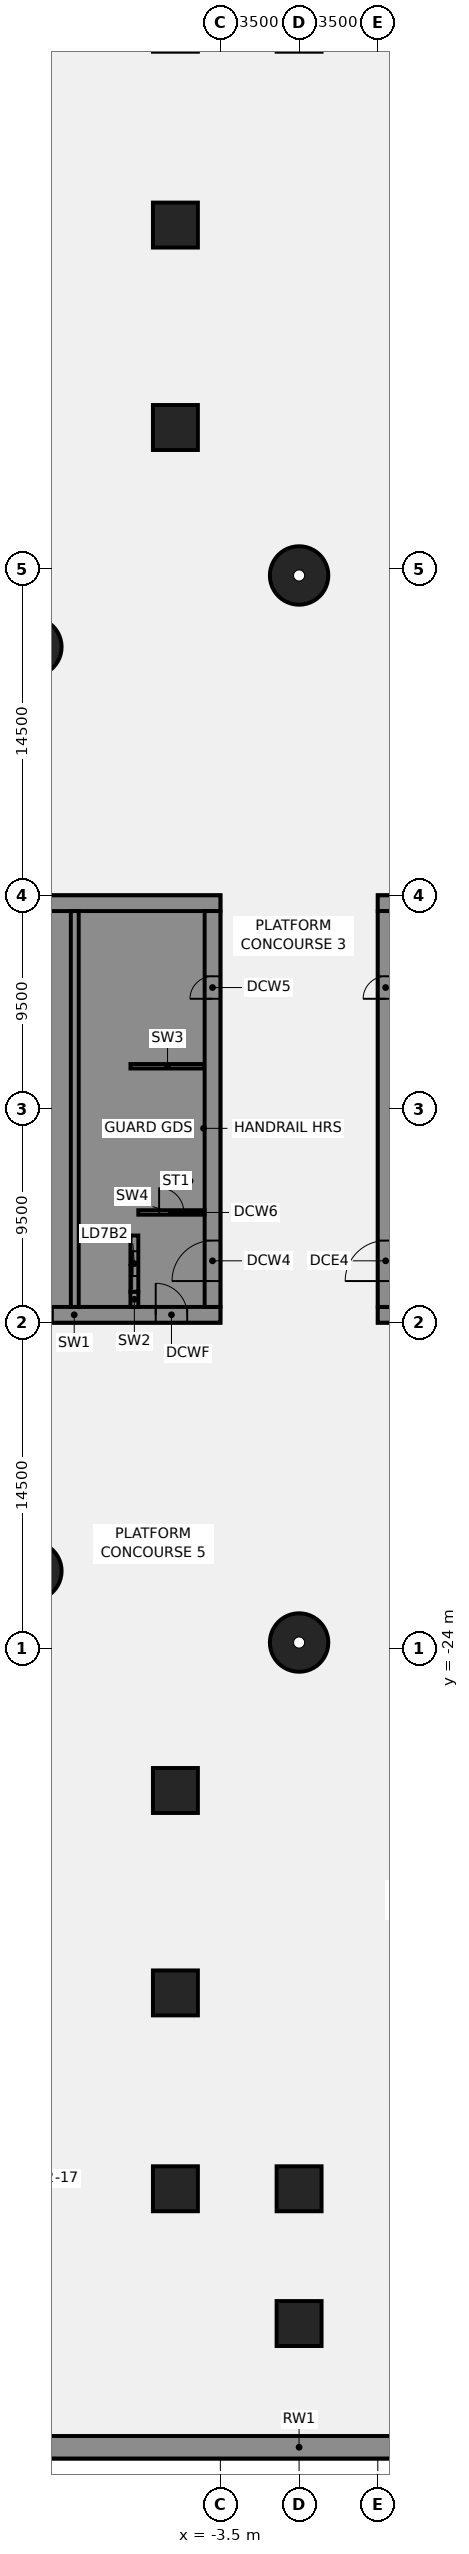
"""IFC4 building model, lengths in metres.
Left out: names, types, materials, properties, quantities, classifications, styles, units other than length and angle.
Written with IfcOpenShell. Run it as: python <this file> out.ifc"""

import sys

from ifc_helpers import new_model, si_unit, direction, frame, frame_2d, origin, origin_2d, place, context, subcontext, project, spatial, polyline, rectangle, circle, outline, extrude, element, fill, save


model = new_model("IFC4")
c1 = context("Model", 3, precision=1e-05, world=origin(), true_north=direction((0.0, 1.0)))
c2 = subcontext(c1, "Body", "Model", "MODEL_VIEW")
j1 = project(units=[si_unit("LENGTHUNIT", "METRE"), si_unit("PLANEANGLEUNIT", "RADIAN")], contexts=[c1])
p1 = place(None, origin())
s1 = spatial("IfcSite", under=j1, at=p1, CompositionType="ELEMENT")
p2 = place(p1, origin())
s2 = spatial("IfcBuilding", under=s1, at=p2, CompositionType="ELEMENT")
p3 = place(p2, frame((0.0, 0.0, -14.0)))
s3 = spatial("IfcBuildingStorey", under=s2, at=p3, CompositionType="ELEMENT", Elevation=-14.0)
p4 = place(p3, frame((63.931, -59.5, -0.45), z_axis=(0.0, 0.0, 1.0), x_axis=(-1.0, 0.0, 0.0)))
e1 = element("IfcWall", 1, at=p4, inside=s3, PredefinedType="SOLIDWALL", context=c2, shape_type="SweptSolid", body=[
    extrude(rectangle(XDim=127.863, YDim=1.0, at=frame_2d((63.931, 0.0))), origin(), (0.0, 0.0, 1.0), 7.0),
])
for number, where, z_axis, x_axis in (
    (2, (0.0, 23.721, -0.45), (0.0, 0.0, 1.0), (1.0, 0.0, 0.0)),
    (3, (-11.86, 20.543, -0.45), (0.0, 0.0, 1.0), (1.0, 0.0, 0.0)),
    (4, (-11.86, -20.543, -0.45), (0.0, 0.0, 1.0), (1.0, 0.0, 0.0)),
    (5, (0.0, -23.721, -0.45), (0.0, 0.0, 1.0), (1.0, 0.0, 0.0)),
):
    element("IfcColumn", number, at=place(p3, frame(where, z_axis=z_axis, x_axis=x_axis)), inside=s3, PredefinedType="COLUMN", context=c2, shape_type="SweptSolid", body=[
        extrude(circle(Radius=1.3, at=origin_2d()), origin(), (0.0, 0.0, 1.0), 7.0),
    ])
for number, where, z_axis, x_axis in (
    (6, (-5.5, 39.3, -0.45), (0.0, 0.0, 1.0), (1.0, 0.0, 0.0)),
    (7, (-5.5, 30.3, -0.45), (0.0, 0.0, 1.0), (1.0, 0.0, 0.0)),
    (8, (-5.5, -39.3, -0.45), (0.0, 0.0, 1.0), (1.0, 0.0, 0.0)),
    (9, (-5.5, -30.3, -0.45), (0.0, 0.0, 1.0), (1.0, 0.0, 0.0)),
    (10, (-5.5, -48.008, -0.45), (0.0, 0.0, 1.0), (1.0, 0.0, 0.0)),
    (11, (0.0, -48.008, -0.45), (0.0, 0.0, 1.0), (1.0, 0.0, 0.0)),
    (12, (0.0, -54.0, -0.45), (0.0, 0.0, 1.0), (1.0, 0.0, 0.0)),
):
    element("IfcColumn", number, at=place(p3, frame(where, z_axis=z_axis, x_axis=x_axis)), inside=s3, PredefinedType="COLUMN", context=c2, shape_type="SweptSolid", body=[
        extrude(rectangle(XDim=2.0, YDim=2.0, at=origin_2d()), origin(), (0.0, 0.0, 1.0), 7.0),
    ])
p5 = place(p3, frame((-16.5, -9.15, 0.0), z_axis=(0.0, 0.0, 1.0), x_axis=(1.0, 0.0, 0.0)))
e13 = element("IfcWall", 13, at=p5, inside=s3, PredefinedType="SHEAR", context=c2, shape_type="SweptSolid", body=[
    extrude(rectangle(XDim=13.0, YDim=0.7, at=frame_2d((6.5, 0.0))), origin(), (0.0, 0.0, 1.0), 6.55),
])
p6 = place(p5, frame((4.15, 0.0, 0.0)))
e14 = element("IfcOpeningElement", 14, at=p6, cuts=e13, PredefinedType="OPENING", context=c2, shape_type="SweptSolid", body=[
    extrude(rectangle(XDim=1.4, YDim=2.1, at=frame_2d((0.7, 1.05))), frame((0.0, 0.36, 0.0), z_axis=(0.0, -1.0, 0.0), x_axis=(1.0, 0.0, 0.0)), (0.0, 0.0, 1.0), 0.72),
])
p7 = place(p5, frame((10.125, 0.0, 0.0)))
e15 = element("IfcOpeningElement", 15, at=p7, cuts=e13, PredefinedType="OPENING", context=c2, shape_type="SweptSolid", body=[
    extrude(rectangle(XDim=1.4, YDim=2.1, at=frame_2d((0.7, 1.05))), frame((0.0, 0.36, 0.0), z_axis=(0.0, -1.0, 0.0), x_axis=(1.0, 0.0, 0.0)), (0.0, 0.0, 1.0), 0.72),
])
p8 = place(p3, frame((-16.5, 9.15, 0.0), z_axis=(0.0, 0.0, 1.0), x_axis=(1.0, 0.0, 0.0)))
e16 = element("IfcWall", 16, at=p8, inside=s3, PredefinedType="SHEAR", context=c2, shape_type="SweptSolid", body=[
    extrude(rectangle(XDim=13.0, YDim=0.7, at=frame_2d((6.5, 0.0))), origin(), (0.0, 0.0, 1.0), 6.55),
])
p9 = place(p3, origin())
e17 = element("IfcWall", 17, at=p9, inside=s3, PredefinedType="SHEAR", context=c2, shape_type="SweptSolid", body=[
    extrude(outline(polyline([(-9.8, -5.375), (-9.8, -5.625), (-7.5, -5.625), (-7.15, -5.625), (-7.15, 8.8), (-7.5, 8.8), (-9.8, 8.8), (-9.8, 8.125), (-7.5, 8.125), (-7.5, 5.625), (-9.8, 5.625), (-9.8, 5.375), (-7.5, 5.375), (-7.5, 2.875), (-9.8, 2.875), (-9.8, 2.625), (-7.5, 2.625), (-7.5, 0.125), (-9.8, 0.125), (-9.8, -0.125), (-7.5, -0.125), (-7.5, -2.625), (-9.8, -2.625), (-9.8, -2.875), (-7.5, -2.875), (-7.5, -5.375), (-9.8, -5.375)])), origin(), (0.0, 0.0, 1.0), 6.55),
])
p10 = place(p3, origin())
e18 = element("IfcWall", 18, at=p10, inside=s3, PredefinedType="SHEAR", context=c2, shape_type="SweptSolid", body=[
    extrude(outline(polyline([(-7.5, -8.125), (-9.55, -8.125), (-9.55, -5.625), (-9.8, -5.625), (-9.8, -8.125), (-9.8, -8.8), (-7.5, -8.8), (-7.5, -8.125)])), origin(), (0.0, 0.0, 1.0), 6.55),
])
p11 = place(p3, frame((-7.325, -8.8, 0.0), z_axis=(0.0, 0.0, 1.0), x_axis=(0.0, 1.0, 0.0)))
e19 = element("IfcWall", 19, at=p11, inside=s3, PredefinedType="SHEAR", context=c2, shape_type="SweptSolid", body=[
    extrude(rectangle(XDim=0.675, YDim=0.35, at=frame_2d((0.337, 0.0))), origin(), (0.0, 0.0, 1.0), 6.55),
])
p12 = place(p3, frame((-7.5, 1.9, 0.0), z_axis=(0.0, 0.0, 1.0), x_axis=(1.0, 0.0, 0.0)))
e20 = element("IfcWall", 20, at=p12, inside=s3, PredefinedType="SHEAR", context=c2, shape_type="SweptSolid", body=[
    extrude(rectangle(XDim=3.3, YDim=0.2, at=frame_2d((1.65, 0.0))), origin(), (0.0, 0.0, 1.0), 6.55),
])
p13 = place(p3, frame((-9.975, -8.8, 0.0), z_axis=(0.0, 0.0, 1.0), x_axis=(0.0, 1.0, 0.0)))
e21 = element("IfcWall", 21, at=p13, inside=s3, PredefinedType="SHEAR", context=c2, shape_type="SweptSolid", body=[
    extrude(rectangle(XDim=17.6, YDim=0.35, at=frame_2d((8.8, 0.0))), origin(), (0.0, 0.0, 1.0), 6.55),
])
p14 = place(p3, frame((-7.325, -8.125, 0.0), z_axis=(0.0, 0.0, 1.0), x_axis=(0.0, 1.0, 0.0)))
e22 = element("IfcWall", 22, at=p14, inside=s3, PredefinedType="SHEAR", context=c2, shape_type="SweptSolid", body=[
    extrude(rectangle(XDim=2.5, YDim=0.35, at=frame_2d((1.25, 0.0))), origin(), (0.0, 0.0, 1.0), 6.55),
])
p15 = place(p14, frame((0.7, 0.0, 0.0)))
e23 = element("IfcOpeningElement", 23, at=p15, cuts=e22, PredefinedType="OPENING", context=c2, shape_type="SweptSolid", body=[
    extrude(rectangle(XDim=1.1, YDim=2.1, at=frame_2d((0.55, 1.05))), frame((0.0, 0.185, 0.0), z_axis=(0.0, -1.0, 0.0), x_axis=(1.0, 0.0, 0.0)), (0.0, 0.0, 1.0), 0.37),
])
p16 = place(p3, frame((-3.85, -8.8, 0.0), z_axis=(0.0, 0.0, 1.0), x_axis=(0.0, 1.0, 0.0)))
e24 = element("IfcWall", 24, at=p16, inside=s3, PredefinedType="SHEAR", context=c2, shape_type="SweptSolid", body=[
    extrude(rectangle(XDim=17.6, YDim=0.7, at=frame_2d((8.8, 0.0))), origin(), (0.0, 0.0, 1.0), 6.55),
])
p17 = place(p16, frame((1.15, 0.0, 0.0)))
e25 = element("IfcOpeningElement", 25, at=p17, cuts=e24, PredefinedType="OPENING", context=c2, shape_type="SweptSolid", body=[
    extrude(rectangle(XDim=1.8, YDim=2.1, at=frame_2d((0.9, 1.05))), frame((0.0, 0.36, 0.0), z_axis=(0.0, -1.0, 0.0), x_axis=(1.0, 0.0, 0.0)), (0.0, 0.0, 1.0), 0.72),
])
p18 = place(p16, frame((13.7, 0.0, 0.0)))
e26 = element("IfcOpeningElement", 26, at=p18, cuts=e24, PredefinedType="OPENING", context=c2, shape_type="SweptSolid", body=[
    extrude(rectangle(XDim=1.0, YDim=2.1, at=frame_2d((0.5, 1.05))), frame((0.0, 0.36, 0.0), z_axis=(0.0, -1.0, 0.0), x_axis=(1.0, 0.0, 0.0)), (0.0, 0.0, 1.0), 0.72),
])
p19 = place(p3, frame((-7.15, -4.6, 0.0), z_axis=(0.0, 0.0, 1.0), x_axis=(1.0, 0.0, 0.0)))
e27 = element("IfcWall", 27, at=p19, inside=s3, PredefinedType="SHEAR", context=c2, shape_type="SweptSolid", body=[
    extrude(rectangle(XDim=2.95, YDim=0.2, at=frame_2d((1.475, 0.0))), origin(), (0.0, 0.0, 1.0), 6.55),
])
p20 = place(p19, frame((0.925, 0.0, 0.0)))
e28 = element("IfcOpeningElement", 28, at=p20, cuts=e27, PredefinedType="OPENING", context=c2, shape_type="SweptSolid", body=[
    extrude(rectangle(XDim=1.1, YDim=2.1, at=frame_2d((0.55, 1.05))), frame((0.0, 0.11, 0.0), z_axis=(0.0, -1.0, 0.0), x_axis=(1.0, 0.0, 0.0)), (0.0, 0.0, 1.0), 0.22),
])
p21 = place(p3, frame((16.5, -9.15, 0.0), z_axis=(0.0, 0.0, 1.0), x_axis=(-1.0, 0.0, 0.0)))
e29 = element("IfcWall", 29, at=p21, inside=s3, PredefinedType="SHEAR", context=c2, shape_type="SweptSolid", body=[
    extrude(rectangle(XDim=13.0, YDim=0.7, at=frame_2d((6.5, 0.0))), origin(), (0.0, 0.0, 1.0), 6.55),
])
p22 = place(p21, frame((4.15, 0.0, 0.0)))
e30 = element("IfcOpeningElement", 30, at=p22, cuts=e29, PredefinedType="OPENING", context=c2, shape_type="SweptSolid", body=[
    extrude(rectangle(XDim=1.4, YDim=2.1, at=frame_2d((0.7, 1.05))), frame((0.0, 0.36, 0.0), z_axis=(0.0, -1.0, 0.0), x_axis=(1.0, 0.0, 0.0)), (0.0, 0.0, 1.0), 0.72),
])
p23 = place(p21, frame((10.125, 0.0, 0.0)))
e31 = element("IfcOpeningElement", 31, at=p23, cuts=e29, PredefinedType="OPENING", context=c2, shape_type="SweptSolid", body=[
    extrude(rectangle(XDim=1.4, YDim=2.1, at=frame_2d((0.7, 1.05))), frame((0.0, 0.36, 0.0), z_axis=(0.0, -1.0, 0.0), x_axis=(1.0, 0.0, 0.0)), (0.0, 0.0, 1.0), 0.72),
])
p24 = place(p3, frame((16.5, 9.15, 0.0), z_axis=(0.0, 0.0, 1.0), x_axis=(-1.0, 0.0, 0.0)))
e32 = element("IfcWall", 32, at=p24, inside=s3, PredefinedType="SHEAR", context=c2, shape_type="SweptSolid", body=[
    extrude(rectangle(XDim=13.0, YDim=0.7, at=frame_2d((6.5, 0.0))), origin(), (0.0, 0.0, 1.0), 6.55),
])
p25 = place(p3, frame((3.85, -8.8, 0.0), z_axis=(0.0, 0.0, 1.0), x_axis=(0.0, 1.0, 0.0)))
e33 = element("IfcWall", 33, at=p25, inside=s3, PredefinedType="SHEAR", context=c2, shape_type="SweptSolid", body=[
    extrude(rectangle(XDim=17.6, YDim=0.7, at=frame_2d((8.8, 0.0))), origin(), (0.0, 0.0, 1.0), 6.55),
])
p26 = place(p25, frame((1.15, 0.0, 0.0)))
e34 = element("IfcOpeningElement", 34, at=p26, cuts=e33, PredefinedType="OPENING", context=c2, shape_type="SweptSolid", body=[
    extrude(rectangle(XDim=1.8, YDim=2.1, at=frame_2d((0.9, 1.05))), frame((0.0, 0.36, 0.0), z_axis=(0.0, -1.0, 0.0), x_axis=(1.0, 0.0, 0.0)), (0.0, 0.0, 1.0), 0.72),
])
p27 = place(p25, frame((13.7, 0.0, 0.0)))
e35 = element("IfcOpeningElement", 35, at=p27, cuts=e33, PredefinedType="OPENING", context=c2, shape_type="SweptSolid", body=[
    extrude(rectangle(XDim=1.0, YDim=2.1, at=frame_2d((0.5, 1.05))), frame((0.0, 0.36, 0.0), z_axis=(0.0, -1.0, 0.0), x_axis=(1.0, 0.0, 0.0)), (0.0, 0.0, 1.0), 0.72),
])
p28 = place(p6, origin())
e36 = element("IfcDoor", 36, at=p28, inside=s3, OperationType="SINGLE_SWING_LEFT", PredefinedType="DOOR", context=c2, shape_type="SweptSolid", body=[
    extrude(rectangle(XDim=1.4, YDim=2.1, at=frame_2d((0.7, 1.05))), frame((0.0, 0.025, 0.0), z_axis=(0.0, -1.0, 0.0), x_axis=(1.0, 0.0, 0.0)), (0.0, 0.0, 1.0), 0.05),
])
fill(e14, e36)
p29 = place(p7, origin())
e37 = element("IfcDoor", 37, at=p29, inside=s3, OperationType="SINGLE_SWING_LEFT", PredefinedType="DOOR", context=c2, shape_type="SweptSolid", body=[
    extrude(rectangle(XDim=1.4, YDim=2.1, at=frame_2d((0.7, 1.05))), frame((0.0, 0.025, 0.0), z_axis=(0.0, -1.0, 0.0), x_axis=(1.0, 0.0, 0.0)), (0.0, 0.0, 1.0), 0.05),
])
fill(e15, e37)
p30 = place(p17, origin())
e38 = element("IfcDoor", 38, at=p30, inside=s3, OperationType="SINGLE_SWING_LEFT", PredefinedType="DOOR", context=c2, shape_type="SweptSolid", body=[
    extrude(rectangle(XDim=1.8, YDim=2.1, at=frame_2d((0.9, 1.05))), frame((0.0, 0.025, 0.0), z_axis=(0.0, -1.0, 0.0), x_axis=(1.0, 0.0, 0.0)), (0.0, 0.0, 1.0), 0.05),
])
fill(e25, e38)
p31 = place(p18, origin())
e39 = element("IfcDoor", 39, at=p31, inside=s3, OperationType="SINGLE_SWING_LEFT", PredefinedType="DOOR", context=c2, shape_type="SweptSolid", body=[
    extrude(rectangle(XDim=1.0, YDim=2.1, at=frame_2d((0.5, 1.05))), frame((0.0, 0.025, 0.0), z_axis=(0.0, -1.0, 0.0), x_axis=(1.0, 0.0, 0.0)), (0.0, 0.0, 1.0), 0.05),
])
fill(e26, e39)
p32 = place(p20, origin())
e40 = element("IfcDoor", 40, at=p32, inside=s3, OperationType="SINGLE_SWING_LEFT", PredefinedType="DOOR", context=c2, shape_type="SweptSolid", body=[
    extrude(rectangle(XDim=1.1, YDim=2.1, at=frame_2d((0.55, 1.05))), frame((0.0, 0.025, 0.0), z_axis=(0.0, -1.0, 0.0), x_axis=(1.0, 0.0, 0.0)), (0.0, 0.0, 1.0), 0.05),
])
fill(e28, e40)
p33 = place(p15, origin())
e41 = element("IfcDoor", 41, at=p33, inside=s3, OperationType="SLIDING_TO_LEFT", PredefinedType="DOOR", context=c2, shape_type="SweptSolid", body=[
    extrude(rectangle(XDim=1.1, YDim=2.1, at=frame_2d((0.55, 1.05))), frame((0.0, 0.025, 0.0), z_axis=(0.0, -1.0, 0.0), x_axis=(1.0, 0.0, 0.0)), (0.0, 0.0, 1.0), 0.05),
])
fill(e23, e41)
p34 = place(p26, origin())
e42 = element("IfcDoor", 42, at=p34, inside=s3, OperationType="SINGLE_SWING_LEFT", PredefinedType="DOOR", context=c2, shape_type="SweptSolid", body=[
    extrude(rectangle(XDim=1.8, YDim=2.1, at=frame_2d((0.9, 1.05))), frame((0.0, 0.025, 0.0), z_axis=(0.0, -1.0, 0.0), x_axis=(1.0, 0.0, 0.0)), (0.0, 0.0, 1.0), 0.05),
])
fill(e34, e42)
p35 = place(p27, origin())
e43 = element("IfcDoor", 43, at=p35, inside=s3, OperationType="SINGLE_SWING_LEFT", PredefinedType="DOOR", context=c2, shape_type="SweptSolid", body=[
    extrude(rectangle(XDim=1.0, YDim=2.1, at=frame_2d((0.5, 1.05))), frame((0.0, 0.025, 0.0), z_axis=(0.0, -1.0, 0.0), x_axis=(1.0, 0.0, 0.0)), (0.0, 0.0, 1.0), 0.05),
])
fill(e35, e43)
save(model, sys.argv[1])
